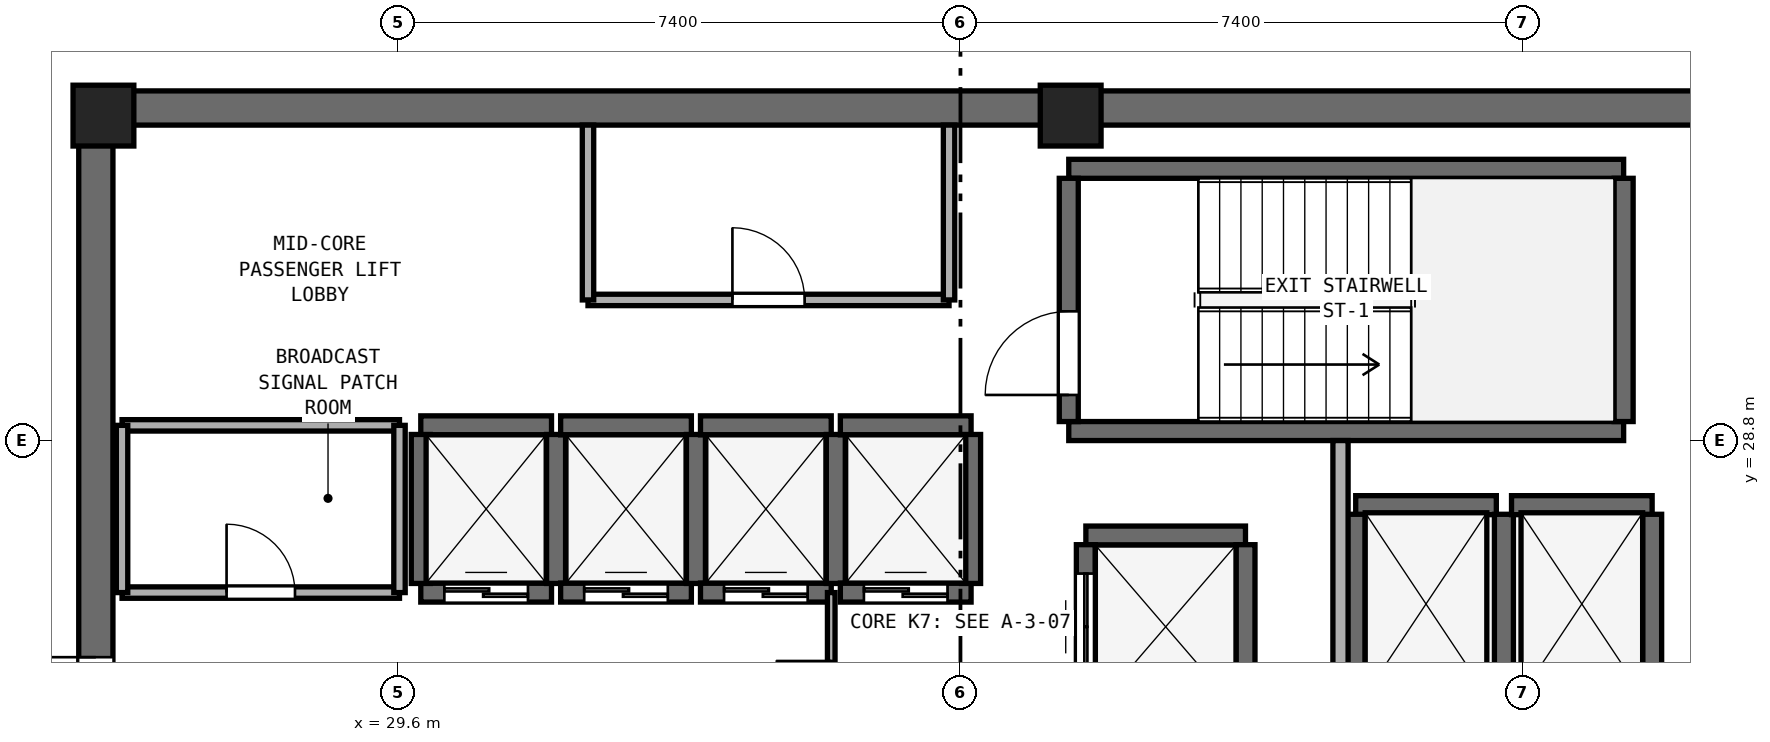
"""IFC4 building model, lengths in metres.
Left out: names, types, materials, properties, quantities, classifications, styles, units other than length and angle.
Written with IfcOpenShell. Run it as: python <this file> out.ifc"""

import sys

from ifc_helpers import new_model, si_unit, direction, frame, frame_2d, origin, origin_2d, place, context, subcontext, project, spatial, rectangle, extrude, element, fill, save


model = new_model("IFC4")
c1 = context("Model", 3, precision=1e-05, world=origin(), true_north=direction((0.0, 1.0)))
c2 = subcontext(c1, "Body", "Model", "MODEL_VIEW")
j1 = project(units=[si_unit("LENGTHUNIT", "METRE"), si_unit("PLANEANGLEUNIT", "RADIAN")], contexts=[c1])
p1 = place(None, origin())
s1 = spatial("IfcSite", under=j1, at=p1, CompositionType="ELEMENT")
p2 = place(p1, origin())
s2 = spatial("IfcBuilding", under=s1, at=p2, CompositionType="ELEMENT")
p3 = place(p2, frame((0.0, 0.0, 282.0)))
s3 = spatial("IfcBuildingStorey", under=s2, at=p3, CompositionType="ELEMENT", Elevation=282.0)
p4 = place(p3, frame((25.4, 33.175, 0.0), z_axis=(0.0, 0.0, 1.0), x_axis=(1.0, 0.0, 0.0)))
e1 = element("IfcWall", 1, at=p4, inside=s3, PredefinedType="SHEAR", context=c2, shape_type="SweptSolid", body=[
    extrude(rectangle(XDim=23.2, YDim=0.45, at=frame_2d((11.6, 0.0))), origin(), (0.0, 0.0, 1.0), 3.54),
])
p5 = place(p3, frame((25.625, 17.45, 0.0), z_axis=(0.0, 0.0, 1.0), x_axis=(0.0, 1.0, 0.0)))
e2 = element("IfcWall", 2, at=p5, inside=s3, PredefinedType="SHEAR", context=c2, shape_type="SweptSolid", body=[
    extrude(rectangle(XDim=15.5, YDim=0.45, at=frame_2d((7.75, 0.0))), origin(), (0.0, 0.0, 1.0), 3.54),
])
p6 = place(p5, frame((7.0, 0.0, 0.0)))
e3 = element("IfcOpeningElement", 3, at=p6, cuts=e2, PredefinedType="OPENING", context=c2, shape_type="SweptSolid", body=[
    extrude(rectangle(XDim=1.5, YDim=2.15, at=frame_2d((0.75, 1.075))), frame((0.0, 0.235, 0.0), z_axis=(0.0, -1.0, 0.0), x_axis=(1.0, 0.0, 0.0)), (0.0, 0.0, 1.0), 0.47),
])
for number, where, z_axis, x_axis in (
    (4, (38.45, 33.075, 0.0), (0.0, 0.0, 1.0), (1.0, 0.0, 0.0)),
    (5, (25.725, 33.075, 0.0), (0.0, 0.0, 1.0), (1.0, 0.0, 0.0)),
):
    element("IfcColumn", number, at=place(p3, frame(where, z_axis=z_axis, x_axis=x_axis)), inside=s3, PredefinedType="PILASTER", context=c2, shape_type="SweptSolid", body=[
        extrude(rectangle(XDim=0.8, YDim=0.8, at=origin_2d()), origin(), (0.0, 0.0, 1.0), 3.8),
    ])
for number, where, z_axis, x_axis in (
    (6, (38.425, 28.925, 0.0), (0.0, 0.0, 1.0), (1.0, 0.0, 0.0)),
    (7, (38.425, 32.375, 0.0), (0.0, 0.0, 1.0), (1.0, 0.0, 0.0)),
):
    element("IfcWall", number, at=place(p3, frame(where, z_axis=z_axis, x_axis=x_axis)), inside=s3, PredefinedType="SHEAR", context=c2, shape_type="SweptSolid", body=[
        extrude(rectangle(XDim=7.3, YDim=0.25, at=frame_2d((3.65, 0.0))), origin(), (0.0, 0.0, 1.0), 3.54),
    ])
p7 = place(p3, frame((38.425, 29.05, 0.0), z_axis=(0.0, 0.0, 1.0), x_axis=(0.0, 1.0, 0.0)))
e8 = element("IfcWall", 8, at=p7, inside=s3, PredefinedType="SHEAR", context=c2, shape_type="SweptSolid", body=[
    extrude(rectangle(XDim=3.2, YDim=0.25, at=frame_2d((1.6, 0.0))), origin(), (0.0, 0.0, 1.0), 3.54),
])
p8 = place(p7, frame((0.35, 0.0, 0.0)))
e9 = element("IfcOpeningElement", 9, at=p8, cuts=e8, PredefinedType="OPENING", context=c2, shape_type="SweptSolid", body=[
    extrude(rectangle(XDim=1.1, YDim=2.15, at=frame_2d((0.55, 1.075))), frame((0.0, 0.135, 0.0), z_axis=(0.0, -1.0, 0.0), x_axis=(1.0, 0.0, 0.0)), (0.0, 0.0, 1.0), 0.27),
])
p9 = place(p3, frame((45.725, 29.05, 0.0), z_axis=(0.0, 0.0, 1.0), x_axis=(0.0, 1.0, 0.0)))
e10 = element("IfcWall", 10, at=p9, inside=s3, PredefinedType="SHEAR", context=c2, shape_type="SweptSolid", body=[
    extrude(rectangle(XDim=3.2, YDim=0.25, at=frame_2d((1.6, 0.0))), origin(), (0.0, 0.0, 1.0), 3.54),
])
p10 = place(p3, frame((29.9, 26.8, 0.0), z_axis=(0.0, 0.0, 1.0), x_axis=(1.0, 0.0, 0.0)))
e11 = element("IfcWall", 11, at=p10, inside=s3, PredefinedType="SHEAR", context=c2, shape_type="SweptSolid", body=[
    extrude(rectangle(XDim=1.72, YDim=0.25, at=frame_2d((0.86, 0.0))), origin(), (0.0, 0.0, 1.0), 3.54),
])
p11 = place(p10, frame((0.31, 0.0, 0.0)))
e12 = element("IfcOpeningElement", 12, at=p11, cuts=e11, PredefinedType="OPENING", context=c2, shape_type="SweptSolid", body=[
    extrude(rectangle(XDim=1.1, YDim=2.15, at=frame_2d((0.55, 1.075))), frame((0.0, 0.135, 0.0), z_axis=(0.0, -1.0, 0.0), x_axis=(1.0, 0.0, 0.0)), (0.0, 0.0, 1.0), 0.27),
])
p12 = place(p3, frame((29.9, 29.0, 0.0), z_axis=(0.0, 0.0, 1.0), x_axis=(1.0, 0.0, 0.0)))
e13 = element("IfcWall", 13, at=p12, inside=s3, PredefinedType="SHEAR", context=c2, shape_type="SweptSolid", body=[
    extrude(rectangle(XDim=1.72, YDim=0.25, at=frame_2d((0.86, 0.0))), origin(), (0.0, 0.0, 1.0), 3.54),
])
for number, where, z_axis, x_axis in (
    (14, (29.9, 26.92, 0.0), (0.0, 0.0, 1.0), (0.0, 1.0, 0.0)),
    (15, (31.68, 26.92, 0.0), (0.0, 0.0, 1.0), (0.0, 1.0, 0.0)),
):
    element("IfcWall", number, at=place(p3, frame(where, z_axis=z_axis, x_axis=x_axis)), inside=s3, PredefinedType="SHEAR", context=c2, shape_type="SweptSolid", body=[
        extrude(rectangle(XDim=1.96, YDim=0.25, at=frame_2d((0.98, 0.0))), origin(), (0.0, 0.0, 1.0), 3.54),
    ])
p13 = place(p3, frame((31.74, 26.8, 0.0), z_axis=(0.0, 0.0, 1.0), x_axis=(1.0, 0.0, 0.0)))
e16 = element("IfcWall", 16, at=p13, inside=s3, PredefinedType="SHEAR", context=c2, shape_type="SweptSolid", body=[
    extrude(rectangle(XDim=1.72, YDim=0.25, at=frame_2d((0.86, 0.0))), origin(), (0.0, 0.0, 1.0), 3.54),
])
p14 = place(p13, frame((0.31, 0.0, 0.0)))
e17 = element("IfcOpeningElement", 17, at=p14, cuts=e16, PredefinedType="OPENING", context=c2, shape_type="SweptSolid", body=[
    extrude(rectangle(XDim=1.1, YDim=2.15, at=frame_2d((0.55, 1.075))), frame((0.0, 0.135, 0.0), z_axis=(0.0, -1.0, 0.0), x_axis=(1.0, 0.0, 0.0)), (0.0, 0.0, 1.0), 0.27),
])
p15 = place(p3, frame((31.74, 29.0, 0.0), z_axis=(0.0, 0.0, 1.0), x_axis=(1.0, 0.0, 0.0)))
e18 = element("IfcWall", 18, at=p15, inside=s3, PredefinedType="SHEAR", context=c2, shape_type="SweptSolid", body=[
    extrude(rectangle(XDim=1.72, YDim=0.25, at=frame_2d((0.86, 0.0))), origin(), (0.0, 0.0, 1.0), 3.54),
])
p16 = place(p3, frame((33.52, 26.92, 0.0), z_axis=(0.0, 0.0, 1.0), x_axis=(0.0, 1.0, 0.0)))
e19 = element("IfcWall", 19, at=p16, inside=s3, PredefinedType="SHEAR", context=c2, shape_type="SweptSolid", body=[
    extrude(rectangle(XDim=1.96, YDim=0.25, at=frame_2d((0.98, 0.0))), origin(), (0.0, 0.0, 1.0), 3.54),
])
p17 = place(p3, frame((33.58, 26.8, 0.0), z_axis=(0.0, 0.0, 1.0), x_axis=(1.0, 0.0, 0.0)))
e20 = element("IfcWall", 20, at=p17, inside=s3, PredefinedType="SHEAR", context=c2, shape_type="SweptSolid", body=[
    extrude(rectangle(XDim=1.72, YDim=0.25, at=frame_2d((0.86, 0.0))), origin(), (0.0, 0.0, 1.0), 3.54),
])
p18 = place(p17, frame((0.31, 0.0, 0.0)))
e21 = element("IfcOpeningElement", 21, at=p18, cuts=e20, PredefinedType="OPENING", context=c2, shape_type="SweptSolid", body=[
    extrude(rectangle(XDim=1.1, YDim=2.15, at=frame_2d((0.55, 1.075))), frame((0.0, 0.135, 0.0), z_axis=(0.0, -1.0, 0.0), x_axis=(1.0, 0.0, 0.0)), (0.0, 0.0, 1.0), 0.27),
])
p19 = place(p3, frame((33.58, 29.0, 0.0), z_axis=(0.0, 0.0, 1.0), x_axis=(1.0, 0.0, 0.0)))
e22 = element("IfcWall", 22, at=p19, inside=s3, PredefinedType="SHEAR", context=c2, shape_type="SweptSolid", body=[
    extrude(rectangle(XDim=1.72, YDim=0.25, at=frame_2d((0.86, 0.0))), origin(), (0.0, 0.0, 1.0), 3.54),
])
p20 = place(p3, frame((35.36, 26.92, 0.0), z_axis=(0.0, 0.0, 1.0), x_axis=(0.0, 1.0, 0.0)))
e23 = element("IfcWall", 23, at=p20, inside=s3, PredefinedType="SHEAR", context=c2, shape_type="SweptSolid", body=[
    extrude(rectangle(XDim=1.96, YDim=0.25, at=frame_2d((0.98, 0.0))), origin(), (0.0, 0.0, 1.0), 3.54),
])
p21 = place(p3, frame((35.42, 26.8, 0.0), z_axis=(0.0, 0.0, 1.0), x_axis=(1.0, 0.0, 0.0)))
e24 = element("IfcWall", 24, at=p21, inside=s3, PredefinedType="SHEAR", context=c2, shape_type="SweptSolid", body=[
    extrude(rectangle(XDim=1.72, YDim=0.25, at=frame_2d((0.86, 0.0))), origin(), (0.0, 0.0, 1.0), 3.54),
])
p22 = place(p21, frame((0.31, 0.0, 0.0)))
e25 = element("IfcOpeningElement", 25, at=p22, cuts=e24, PredefinedType="OPENING", context=c2, shape_type="SweptSolid", body=[
    extrude(rectangle(XDim=1.1, YDim=2.15, at=frame_2d((0.55, 1.075))), frame((0.0, 0.135, 0.0), z_axis=(0.0, -1.0, 0.0), x_axis=(1.0, 0.0, 0.0)), (0.0, 0.0, 1.0), 0.27),
])
p23 = place(p3, frame((35.42, 29.0, 0.0), z_axis=(0.0, 0.0, 1.0), x_axis=(1.0, 0.0, 0.0)))
e26 = element("IfcWall", 26, at=p23, inside=s3, PredefinedType="SHEAR", context=c2, shape_type="SweptSolid", body=[
    extrude(rectangle(XDim=1.72, YDim=0.25, at=frame_2d((0.86, 0.0))), origin(), (0.0, 0.0, 1.0), 3.54),
])
p24 = place(p3, frame((37.14, 26.92, 0.0), z_axis=(0.0, 0.0, 1.0), x_axis=(0.0, 1.0, 0.0)))
e27 = element("IfcWall", 27, at=p24, inside=s3, PredefinedType="SHEAR", context=c2, shape_type="SweptSolid", body=[
    extrude(rectangle(XDim=1.96, YDim=0.25, at=frame_2d((0.98, 0.0))), origin(), (0.0, 0.0, 1.0), 3.54),
])
p25 = place(p3, frame((42.2, 27.95, 0.0), z_axis=(0.0, 0.0, 1.0), x_axis=(1.0, 0.0, 0.0)))
e28 = element("IfcWall", 28, at=p25, inside=s3, PredefinedType="SHEAR", context=c2, shape_type="SweptSolid", body=[
    extrude(rectangle(XDim=1.85, YDim=0.25, at=frame_2d((0.925, 0.0))), origin(), (0.0, 0.0, 1.0), 3.54),
])
for number, where, z_axis, x_axis in (
    (29, (42.2, 25.47, 0.0), (0.0, 0.0, 1.0), (0.0, 1.0, 0.0)),
    (30, (44.15, 25.47, 0.0), (0.0, 0.0, 1.0), (0.0, 1.0, 0.0)),
):
    element("IfcWall", number, at=place(p3, frame(where, z_axis=z_axis, x_axis=x_axis)), inside=s3, PredefinedType="SHEAR", context=c2, shape_type="SweptSolid", body=[
        extrude(rectangle(XDim=2.36, YDim=0.25, at=frame_2d((1.18, 0.0))), origin(), (0.0, 0.0, 1.0), 3.54),
    ])
p26 = place(p3, frame((44.25, 27.95, 0.0), z_axis=(0.0, 0.0, 1.0), x_axis=(1.0, 0.0, 0.0)))
e31 = element("IfcWall", 31, at=p26, inside=s3, PredefinedType="SHEAR", context=c2, shape_type="SweptSolid", body=[
    extrude(rectangle(XDim=1.85, YDim=0.25, at=frame_2d((0.925, 0.0))), origin(), (0.0, 0.0, 1.0), 3.54),
])
p27 = place(p3, frame((46.1, 25.47, 0.0), z_axis=(0.0, 0.0, 1.0), x_axis=(0.0, 1.0, 0.0)))
e32 = element("IfcWall", 32, at=p27, inside=s3, PredefinedType="SHEAR", context=c2, shape_type="SweptSolid", body=[
    extrude(rectangle(XDim=2.36, YDim=0.25, at=frame_2d((1.18, 0.0))), origin(), (0.0, 0.0, 1.0), 3.54),
])
p28 = place(p3, frame((38.65, 27.55, 0.0), z_axis=(0.0, 0.0, 1.0), x_axis=(1.0, 0.0, 0.0)))
e33 = element("IfcWall", 33, at=p28, inside=s3, PredefinedType="SHEAR", context=c2, shape_type="SweptSolid", body=[
    extrude(rectangle(XDim=2.1, YDim=0.25, at=frame_2d((1.05, 0.0))), origin(), (0.0, 0.0, 1.0), 3.54),
])
p29 = place(p3, frame((38.65, 25.27, 0.0), z_axis=(0.0, 0.0, 1.0), x_axis=(0.0, 1.0, 0.0)))
e34 = element("IfcWall", 34, at=p29, inside=s3, PredefinedType="SHEAR", context=c2, shape_type="SweptSolid", body=[
    extrude(rectangle(XDim=2.16, YDim=0.25, at=frame_2d((1.08, 0.0))), origin(), (0.0, 0.0, 1.0), 3.54),
])
p30 = place(p29, frame((0.38, 0.0, 0.0)))
e35 = element("IfcOpeningElement", 35, at=p30, cuts=e34, PredefinedType="OPENING", context=c2, shape_type="SweptSolid", body=[
    extrude(rectangle(XDim=1.4, YDim=2.2, at=frame_2d((0.7, 1.1))), frame((0.0, 0.135, 0.0), z_axis=(0.0, -1.0, 0.0), x_axis=(1.0, 0.0, 0.0)), (0.0, 0.0, 1.0), 0.27),
])
p31 = place(p3, frame((40.75, 25.27, 0.0), z_axis=(0.0, 0.0, 1.0), x_axis=(0.0, 1.0, 0.0)))
e36 = element("IfcWall", 36, at=p31, inside=s3, PredefinedType="SHEAR", context=c2, shape_type="SweptSolid", body=[
    extrude(rectangle(XDim=2.16, YDim=0.25, at=frame_2d((1.08, 0.0))), origin(), (0.0, 0.0, 1.0), 3.54),
])
p32 = place(p3, frame((42.0, 22.75, 0.0), z_axis=(0.0, 0.0, 1.0), x_axis=(0.0, 1.0, 0.0)))
e37 = element("IfcWall", 37, at=p32, inside=s3, PredefinedType="SOLIDWALL", context=c2, shape_type="SweptSolid", body=[
    extrude(rectangle(XDim=6.05, YDim=0.2, at=frame_2d((3.025, 0.0))), origin(), (0.0, 0.0, 1.0), 3.54),
])
p33 = place(p32, frame((0.65, 0.0, 0.0)))
e38 = element("IfcOpeningElement", 38, at=p33, cuts=e37, PredefinedType="OPENING", context=c2, shape_type="SweptSolid", body=[
    extrude(rectangle(XDim=1.2, YDim=2.15, at=frame_2d((0.6, 1.075))), frame((0.0, 0.11, 0.0), z_axis=(0.0, -1.0, 0.0), x_axis=(1.0, 0.0, 0.0)), (0.0, 0.0, 1.0), 0.22),
])
p34 = place(p3, frame((32.1, 30.65, 0.0), z_axis=(0.0, 0.0, 1.0), x_axis=(1.0, 0.0, 0.0)))
e39 = element("IfcWall", 39, at=p34, inside=s3, PredefinedType="PARTITIONING", context=c2, shape_type="SweptSolid", body=[
    extrude(rectangle(XDim=4.75, YDim=0.15, at=frame_2d((2.375, 0.0))), origin(), (0.0, 0.0, 1.0), 3.54),
])
p35 = place(p34, frame((1.9, 0.0, 0.0)))
e40 = element("IfcOpeningElement", 40, at=p35, cuts=e39, PredefinedType="OPENING", context=c2, shape_type="SweptSolid", body=[
    extrude(rectangle(XDim=0.95, YDim=2.1, at=frame_2d((0.475, 1.05))), frame((0.0, 0.085, 0.0), z_axis=(0.0, -1.0, 0.0), x_axis=(1.0, 0.0, 0.0)), (0.0, 0.0, 1.0), 0.17),
])
for number, where, z_axis, x_axis in (
    (41, (32.1, 30.65, 0.0), (0.0, 0.0, 1.0), (0.0, 1.0, 0.0)),
    (42, (36.85, 30.65, 0.0), (0.0, 0.0, 1.0), (0.0, 1.0, 0.0)),
):
    element("IfcWall", number, at=place(p3, frame(where, z_axis=z_axis, x_axis=x_axis)), inside=s3, PredefinedType="PARTITIONING", context=c2, shape_type="SweptSolid", body=[
        extrude(rectangle(XDim=2.3, YDim=0.15, at=frame_2d((1.15, 0.0))), origin(), (0.0, 0.0, 1.0), 3.54),
    ])
p36 = place(p3, frame((25.97, 26.8, 0.0), z_axis=(0.0, 0.0, 1.0), x_axis=(1.0, 0.0, 0.0)))
e43 = element("IfcWall", 43, at=p36, inside=s3, PredefinedType="PARTITIONING", context=c2, shape_type="SweptSolid", body=[
    extrude(rectangle(XDim=3.65, YDim=0.15, at=frame_2d((1.825, 0.0))), origin(), (0.0, 0.0, 1.0), 3.54),
])
p37 = place(p36, frame((1.375, 0.0, 0.0)))
e44 = element("IfcOpeningElement", 44, at=p37, cuts=e43, PredefinedType="OPENING", context=c2, shape_type="SweptSolid", body=[
    extrude(rectangle(XDim=0.9, YDim=2.1, at=frame_2d((0.45, 1.05))), frame((0.0, 0.085, 0.0), z_axis=(0.0, -1.0, 0.0), x_axis=(1.0, 0.0, 0.0)), (0.0, 0.0, 1.0), 0.17),
])
p38 = place(p3, frame((25.97, 29.0, 0.0), z_axis=(0.0, 0.0, 1.0), x_axis=(1.0, 0.0, 0.0)))
e45 = element("IfcWall", 45, at=p38, inside=s3, PredefinedType="PARTITIONING", context=c2, shape_type="SweptSolid", body=[
    extrude(rectangle(XDim=3.65, YDim=0.15, at=frame_2d((1.825, 0.0))), origin(), (0.0, 0.0, 1.0), 3.54),
])
p39 = place(p3, frame((25.97, 26.8, 0.0), z_axis=(0.0, 0.0, 1.0), x_axis=(0.0, 1.0, 0.0)))
e46 = element("IfcWall", 46, at=p39, inside=s3, PredefinedType="PARTITIONING", context=c2, shape_type="SweptSolid", body=[
    extrude(rectangle(XDim=2.2, YDim=0.15, at=frame_2d((1.1, 0.0))), origin(), (0.0, 0.0, 1.0), 2.64),
])
p40 = place(p3, frame((29.62, 26.8, 0.0), z_axis=(0.0, 0.0, 1.0), x_axis=(0.0, 1.0, 0.0)))
e47 = element("IfcWall", 47, at=p40, inside=s3, PredefinedType="PARTITIONING", context=c2, shape_type="SweptSolid", body=[
    extrude(rectangle(XDim=2.2, YDim=0.15, at=frame_2d((1.1, 0.0))), origin(), (0.0, 0.0, 1.0), 3.54),
])
p41 = place(p3, frame((35.3, 23.6, 0.0), z_axis=(0.0, 0.0, 1.0), x_axis=(0.0, 1.0, 0.0)))
e48 = element("IfcWall", 48, at=p41, inside=s3, PredefinedType="PARTITIONING", context=c2, shape_type="SweptSolid", body=[
    extrude(rectangle(XDim=3.2, YDim=0.1, at=frame_2d((1.6, 0.0))), origin(), (0.0, 0.0, 1.0), 3.54),
])
p42 = place(p41, frame((0.85, 0.0, 0.0)))
e49 = element("IfcOpeningElement", 49, at=p42, cuts=e48, PredefinedType="OPENING", context=c2, shape_type="SweptSolid", body=[
    extrude(rectangle(XDim=1.45, YDim=2.12, at=frame_2d((0.725, 1.06))), frame((0.0, 0.06, 0.0), z_axis=(0.0, -1.0, 0.0), x_axis=(1.0, 0.0, 0.0)), (0.0, 0.0, 1.0), 0.12),
])
p43 = place(p8, origin())
e50 = element("IfcDoor", 50, at=p43, inside=s3, OperationType="SINGLE_SWING_LEFT", PredefinedType="DOOR", context=c2, shape_type="SweptSolid", body=[
    extrude(rectangle(XDim=1.1, YDim=2.15, at=frame_2d((0.55, 1.075))), frame((0.0, 0.025, 0.0), z_axis=(0.0, -1.0, 0.0), x_axis=(1.0, 0.0, 0.0)), (0.0, 0.0, 1.0), 0.05),
])
fill(e9, e50)
p44 = place(p11, origin())
e51 = element("IfcDoor", 51, at=p44, inside=s3, OperationType="DOUBLE_DOOR_SLIDING", PredefinedType="DOOR", context=c2, shape_type="SweptSolid", body=[
    extrude(rectangle(XDim=1.1, YDim=2.15, at=frame_2d((0.55, 1.075))), frame((0.0, 0.025, 0.0), z_axis=(0.0, -1.0, 0.0), x_axis=(1.0, 0.0, 0.0)), (0.0, 0.0, 1.0), 0.05),
])
fill(e12, e51)
p45 = place(p14, origin())
e52 = element("IfcDoor", 52, at=p45, inside=s3, OperationType="DOUBLE_DOOR_SLIDING", PredefinedType="DOOR", context=c2, shape_type="SweptSolid", body=[
    extrude(rectangle(XDim=1.1, YDim=2.15, at=frame_2d((0.55, 1.075))), frame((0.0, 0.025, 0.0), z_axis=(0.0, -1.0, 0.0), x_axis=(1.0, 0.0, 0.0)), (0.0, 0.0, 1.0), 0.05),
])
fill(e17, e52)
p46 = place(p18, origin())
e53 = element("IfcDoor", 53, at=p46, inside=s3, OperationType="DOUBLE_DOOR_SLIDING", PredefinedType="DOOR", context=c2, shape_type="SweptSolid", body=[
    extrude(rectangle(XDim=1.1, YDim=2.15, at=frame_2d((0.55, 1.075))), frame((0.0, 0.025, 0.0), z_axis=(0.0, -1.0, 0.0), x_axis=(1.0, 0.0, 0.0)), (0.0, 0.0, 1.0), 0.05),
])
fill(e21, e53)
p47 = place(p22, origin())
e54 = element("IfcDoor", 54, at=p47, inside=s3, OperationType="DOUBLE_DOOR_SLIDING", PredefinedType="DOOR", context=c2, shape_type="SweptSolid", body=[
    extrude(rectangle(XDim=1.1, YDim=2.15, at=frame_2d((0.55, 1.075))), frame((0.0, 0.025, 0.0), z_axis=(0.0, -1.0, 0.0), x_axis=(1.0, 0.0, 0.0)), (0.0, 0.0, 1.0), 0.05),
])
fill(e25, e54)
p48 = place(p30, origin())
e55 = element("IfcDoor", 55, at=p48, inside=s3, OperationType="DOUBLE_DOOR_SLIDING", PredefinedType="DOOR", context=c2, shape_type="SweptSolid", body=[
    extrude(rectangle(XDim=1.4, YDim=2.2, at=frame_2d((0.7, 1.1))), frame((0.0, 0.025, 0.0), z_axis=(0.0, -1.0, 0.0), x_axis=(1.0, 0.0, 0.0)), (0.0, 0.0, 1.0), 0.05),
])
fill(e35, e55)
p49 = place(p6, origin())
e56 = element("IfcDoor", 56, at=p49, inside=s3, OperationType="DOUBLE_DOOR_SINGLE_SWING", PredefinedType="DOOR", context=c2, shape_type="SweptSolid", body=[
    extrude(rectangle(XDim=1.5, YDim=2.15, at=frame_2d((0.75, 1.075))), frame((0.0, 0.025, 0.0), z_axis=(0.0, -1.0, 0.0), x_axis=(1.0, 0.0, 0.0)), (0.0, 0.0, 1.0), 0.05),
])
fill(e3, e56)
p50 = place(p35, origin())
e57 = element("IfcDoor", 57, at=p50, inside=s3, OperationType="SINGLE_SWING_LEFT", PredefinedType="DOOR", context=c2, shape_type="SweptSolid", body=[
    extrude(rectangle(XDim=0.95, YDim=2.1, at=frame_2d((0.475, 1.05))), frame((0.0, 0.025, 0.0), z_axis=(0.0, -1.0, 0.0), x_axis=(1.0, 0.0, 0.0)), (0.0, 0.0, 1.0), 0.05),
])
fill(e40, e57)
p51 = place(p37, origin())
e58 = element("IfcDoor", 58, at=p51, inside=s3, OperationType="SINGLE_SWING_LEFT", PredefinedType="DOOR", context=c2, shape_type="SweptSolid", body=[
    extrude(rectangle(XDim=0.9, YDim=2.1, at=frame_2d((0.45, 1.05))), frame((0.0, 0.025, 0.0), z_axis=(0.0, -1.0, 0.0), x_axis=(1.0, 0.0, 0.0)), (0.0, 0.0, 1.0), 0.05),
])
fill(e44, e58)
p52 = place(p42, origin())
e59 = element("IfcDoor", 59, at=p52, inside=s3, OperationType="DOUBLE_DOOR_SINGLE_SWING", PredefinedType="DOOR", context=c2, shape_type="SweptSolid", body=[
    extrude(rectangle(XDim=1.45, YDim=2.12, at=frame_2d((0.725, 1.06))), frame((0.0, 0.025, 0.0), z_axis=(0.0, -1.0, 0.0), x_axis=(1.0, 0.0, 0.0)), (0.0, 0.0, 1.0), 0.05),
])
fill(e49, e59)
save(model, sys.argv[1])
